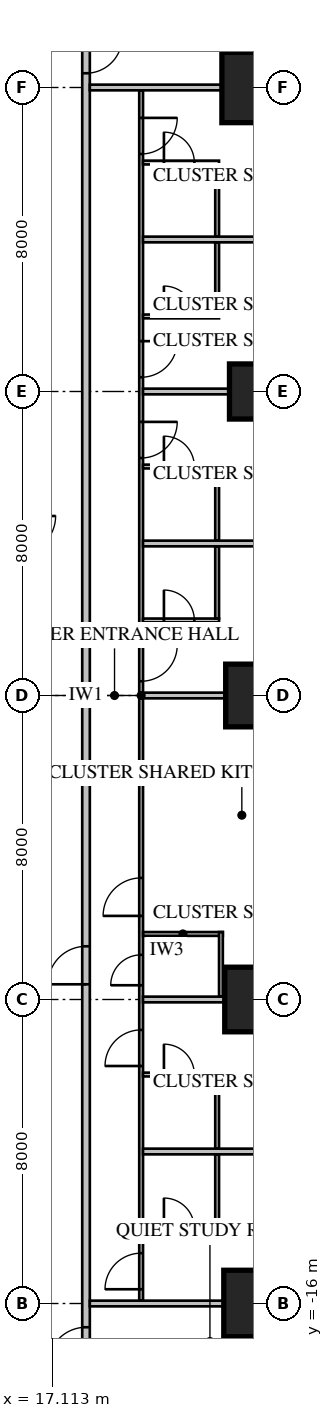
"""IFC4 building model, lengths in metres.
Left out: names, types, materials, properties, quantities, classifications, styles, units other than length and angle.
Written with IfcOpenShell. Run it as: python <this file> out.ifc"""

import sys

from ifc_helpers import new_model, si_unit, direction, frame, frame_2d, origin, origin_2d, place, context, subcontext, project, spatial, rectangle, extrude, element, fill, save


model = new_model("IFC4")
c1 = context("Model", 3, precision=1e-05, world=origin(), true_north=direction((0.0, 1.0)))
c2 = subcontext(c1, "Body", "Model", "MODEL_VIEW")
j1 = project(units=[si_unit("LENGTHUNIT", "METRE"), si_unit("PLANEANGLEUNIT", "RADIAN")], contexts=[c1])
p1 = place(None, origin())
s1 = spatial("IfcSite", under=j1, at=p1, CompositionType="ELEMENT")
p2 = place(p1, origin())
s2 = spatial("IfcBuilding", under=s1, at=p2, CompositionType="ELEMENT")
p3 = place(p2, frame((0.0, 0.0, 35.25)))
s3 = spatial("IfcBuildingStorey", under=s2, at=p3, CompositionType="ELEMENT", Elevation=35.25)
p4 = place(p3, frame((22.5, -16.0, 0.0), z_axis=(0.0, 0.0, 1.0), x_axis=(1.0, 0.0, 0.0)))
e1 = element("IfcColumn", 1, at=p4, inside=s3, PredefinedType="COLUMN", context=c2, shape_type="SweptSolid", body=[
    extrude(rectangle(XDim=1.75, YDim=1.75, at=origin_2d()), origin(), (0.0, 0.0, 1.0), 3.85),
])
p5 = place(p3, frame((22.5, -8.0, 0.0), z_axis=(0.0, 0.0, 1.0), x_axis=(1.0, 0.0, 0.0)))
e2 = element("IfcColumn", 2, at=p5, inside=s3, PredefinedType="COLUMN", context=c2, shape_type="SweptSolid", body=[
    extrude(rectangle(XDim=1.7, YDim=1.7, at=origin_2d()), origin(), (0.0, 0.0, 1.0), 3.85),
])
p6 = place(p3, frame((22.5, 0.0, 0.0), z_axis=(0.0, 0.0, 1.0), x_axis=(1.0, 0.0, 0.0)))
e3 = element("IfcColumn", 3, at=p6, inside=s3, PredefinedType="COLUMN", context=c2, shape_type="SweptSolid", body=[
    extrude(rectangle(XDim=1.65, YDim=1.65, at=origin_2d()), origin(), (0.0, 0.0, 1.0), 3.85),
])
p7 = place(p3, frame((22.5, 8.0, 0.0), z_axis=(0.0, 0.0, 1.0), x_axis=(1.0, 0.0, 0.0)))
e4 = element("IfcColumn", 4, at=p7, inside=s3, PredefinedType="COLUMN", context=c2, shape_type="SweptSolid", body=[
    extrude(rectangle(XDim=1.45, YDim=1.45, at=origin_2d()), origin(), (0.0, 0.0, 1.0), 3.85),
])
p8 = place(p3, frame((22.5, 16.0, 0.0), z_axis=(0.0, 0.0, 1.0), x_axis=(1.0, 0.0, 0.0)))
e5 = element("IfcColumn", 5, at=p8, inside=s3, PredefinedType="COLUMN", context=c2, shape_type="SweptSolid", body=[
    extrude(rectangle(XDim=1.85, YDim=1.85, at=origin_2d()), origin(), (0.0, 0.0, 1.0), 3.85),
])
p9 = place(p3, frame((18.0, -18.0, 0.0), z_axis=(0.0, 0.0, 1.0), x_axis=(0.0, 1.0, 0.0)))
e6 = element("IfcWall", 6, at=p9, inside=s3, PredefinedType="PARTITIONING", context=c2, shape_type="SweptSolid", body=[
    extrude(rectangle(XDim=36.0, YDim=0.2, at=frame_2d((18.0, 0.0))), origin(), (0.0, 0.0, 1.0), 3.65),
])
p10 = place(p9, frame((10.4, 0.0, 0.0)))
e7 = element("IfcOpeningElement", 7, at=p10, cuts=e6, PredefinedType="OPENING", context=c2, shape_type="SweptSolid", body=[
    extrude(rectangle(XDim=1.0, YDim=2.1, at=frame_2d((0.5, 1.05))), frame((0.0, 0.12, 0.0), z_axis=(0.0, -1.0, 0.0), x_axis=(1.0, 0.0, 0.0)), (0.0, 0.0, 1.0), 0.24),
])
p11 = place(p9, frame((0.375, 0.0, 0.0)))
e8 = element("IfcOpeningElement", 8, at=p11, cuts=e6, PredefinedType="OPENING", context=c2, shape_type="SweptSolid", body=[
    extrude(rectangle(XDim=1.0, YDim=2.1, at=frame_2d((0.5, 1.05))), frame((0.0, 0.12, 0.0), z_axis=(0.0, -1.0, 0.0), x_axis=(1.0, 0.0, 0.0)), (0.0, 0.0, 1.0), 0.24),
])
p12 = place(p9, frame((34.375, 0.0, 0.0)))
e9 = element("IfcOpeningElement", 9, at=p12, cuts=e6, PredefinedType="OPENING", context=c2, shape_type="SweptSolid", body=[
    extrude(rectangle(XDim=0.95, YDim=2.1, at=frame_2d((0.475, 1.05))), frame((0.0, 0.12, 0.0), z_axis=(0.0, -1.0, 0.0), x_axis=(1.0, 0.0, 0.0)), (0.0, 0.0, 1.0), 0.24),
])
p13 = place(p3, frame((19.45, -15.925, 0.0), z_axis=(0.0, 0.0, 1.0), x_axis=(0.0, 1.0, 0.0)))
e10 = element("IfcWall", 10, at=p13, inside=s3, PredefinedType="PARTITIONING", context=c2, shape_type="SweptSolid", body=[
    extrude(rectangle(XDim=31.85, YDim=0.1, at=frame_2d((15.925, 0.0))), origin(), (0.0, 0.0, 1.0), 3.65),
])
p14 = place(p13, frame((10.125, 0.0, 0.0)))
e11 = element("IfcOpeningElement", 11, at=p14, cuts=e10, PredefinedType="OPENING", context=c2, shape_type="SweptSolid", body=[
    extrude(rectangle(XDim=1.0, YDim=2.1, at=frame_2d((0.5, 1.05))), frame((0.0, 0.07, 0.0), z_axis=(0.0, -1.0, 0.0), x_axis=(1.0, 0.0, 0.0)), (0.0, 0.0, 1.0), 0.14),
])
p15 = place(p13, frame((8.3, 0.0, 0.0)))
e12 = element("IfcOpeningElement", 12, at=p15, cuts=e10, PredefinedType="OPENING", context=c2, shape_type="SweptSolid", body=[
    extrude(rectangle(XDim=0.8, YDim=2.1, at=frame_2d((0.4, 1.05))), frame((0.0, 0.07, 0.0), z_axis=(0.0, -1.0, 0.0), x_axis=(1.0, 0.0, 0.0)), (0.0, 0.0, 1.0), 0.14),
])
p16 = place(p13, frame((0.3, 0.0, 0.0)))
e13 = element("IfcOpeningElement", 13, at=p16, cuts=e10, PredefinedType="OPENING", context=c2, shape_type="SweptSolid", body=[
    extrude(rectangle(XDim=0.95, YDim=2.1, at=frame_2d((0.475, 1.05))), frame((0.0, 0.07, 0.0), z_axis=(0.0, -1.0, 0.0), x_axis=(1.0, 0.0, 0.0)), (0.0, 0.0, 1.0), 0.14),
])
p17 = place(p13, frame((6.175, 0.0, 0.0)))
e14 = element("IfcOpeningElement", 14, at=p17, cuts=e10, PredefinedType="OPENING", context=c2, shape_type="SweptSolid", body=[
    extrude(rectangle(XDim=0.95, YDim=2.1, at=frame_2d((0.475, 1.05))), frame((0.0, 0.07, 0.0), z_axis=(0.0, -1.0, 0.0), x_axis=(1.0, 0.0, 0.0)), (0.0, 0.0, 1.0), 0.14),
])
p18 = place(p13, frame((16.3, 0.0, 0.0)))
e15 = element("IfcOpeningElement", 15, at=p18, cuts=e10, PredefinedType="OPENING", context=c2, shape_type="SweptSolid", body=[
    extrude(rectangle(XDim=0.95, YDim=2.1, at=frame_2d((0.475, 1.05))), frame((0.0, 0.07, 0.0), z_axis=(0.0, -1.0, 0.0), x_axis=(1.0, 0.0, 0.0)), (0.0, 0.0, 1.0), 0.14),
])
p19 = place(p13, frame((22.175, 0.0, 0.0)))
e16 = element("IfcOpeningElement", 16, at=p19, cuts=e10, PredefinedType="OPENING", context=c2, shape_type="SweptSolid", body=[
    extrude(rectangle(XDim=0.95, YDim=2.1, at=frame_2d((0.475, 1.05))), frame((0.0, 0.07, 0.0), z_axis=(0.0, -1.0, 0.0), x_axis=(1.0, 0.0, 0.0)), (0.0, 0.0, 1.0), 0.14),
])
p20 = place(p13, frame((24.3, 0.0, 0.0)))
e17 = element("IfcOpeningElement", 17, at=p20, cuts=e10, PredefinedType="OPENING", context=c2, shape_type="SweptSolid", body=[
    extrude(rectangle(XDim=0.95, YDim=2.1, at=frame_2d((0.475, 1.05))), frame((0.0, 0.07, 0.0), z_axis=(0.0, -1.0, 0.0), x_axis=(1.0, 0.0, 0.0)), (0.0, 0.0, 1.0), 0.14),
])
p21 = place(p13, frame((30.175, 0.0, 0.0)))
e18 = element("IfcOpeningElement", 18, at=p21, cuts=e10, PredefinedType="OPENING", context=c2, shape_type="SweptSolid", body=[
    extrude(rectangle(XDim=0.95, YDim=2.1, at=frame_2d((0.475, 1.05))), frame((0.0, 0.07, 0.0), z_axis=(0.0, -1.0, 0.0), x_axis=(1.0, 0.0, 0.0)), (0.0, 0.0, 1.0), 0.14),
])
p22 = place(p3, frame((19.5, -6.275, 0.0), z_axis=(0.0, 0.0, 1.0), x_axis=(1.0, 0.0, 0.0)))
e19 = element("IfcWall", 19, at=p22, inside=s3, PredefinedType="PARTITIONING", context=c2, shape_type="SweptSolid", body=[
    extrude(rectangle(XDim=2.1, YDim=0.1, at=frame_2d((1.05, 0.0))), origin(), (0.0, 0.0, 1.0), 3.65),
])
p23 = place(p3, frame((21.55, -7.925, 0.0), z_axis=(0.0, 0.0, 1.0), x_axis=(0.0, 1.0, 0.0)))
e20 = element("IfcWall", 20, at=p23, inside=s3, PredefinedType="PARTITIONING", context=c2, shape_type="SweptSolid", body=[
    extrude(rectangle(XDim=1.7, YDim=0.1, at=frame_2d((0.85, 0.0))), origin(), (0.0, 0.0, 1.0), 3.65),
])
p24 = place(p3, frame((18.1, -16.0, 0.0), z_axis=(0.0, 0.0, 1.0), x_axis=(1.0, 0.0, 0.0)))
e21 = element("IfcWall", 21, at=p24, inside=s3, PredefinedType="PARTITIONING", context=c2, shape_type="SweptSolid", body=[
    extrude(rectangle(XDim=6.589, YDim=0.15, at=frame_2d((3.295, 0.0))), origin(), (0.0, 0.0, 1.0), 3.65),
])
for number, where, z_axis, x_axis in (
    (22, (19.5, -12.0, 0.0), (0.0, 0.0, 1.0), (1.0, 0.0, 0.0)),
    (23, (19.5, -8.0, 0.0), (0.0, 0.0, 1.0), (1.0, 0.0, 0.0)),
):
    element("IfcWall", number, at=place(p3, frame(where, z_axis=z_axis, x_axis=x_axis)), inside=s3, PredefinedType="PARTITIONING", context=c2, shape_type="SweptSolid", body=[
        extrude(rectangle(XDim=5.2, YDim=0.15, at=frame_2d((2.6, 0.0))), origin(), (0.0, 0.0, 1.0), 3.65),
    ])
p25 = place(p3, frame((19.5, 0.0, 0.0), z_axis=(0.0, 0.0, 1.0), x_axis=(1.0, 0.0, 0.0)))
e24 = element("IfcWall", 24, at=p25, inside=s3, PredefinedType="PARTITIONING", context=c2, shape_type="SweptSolid", body=[
    extrude(rectangle(XDim=5.2, YDim=0.15, at=frame_2d((2.6, 0.0))), origin(), (0.0, 0.0, 1.0), 2.957),
])
for number, where, z_axis, x_axis in (
    (25, (19.5, 4.0, 0.0), (0.0, 0.0, 1.0), (1.0, 0.0, 0.0)),
    (26, (19.5, 8.0, 0.0), (0.0, 0.0, 1.0), (1.0, 0.0, 0.0)),
    (27, (19.5, 12.0, 0.0), (0.0, 0.0, 1.0), (1.0, 0.0, 0.0)),
):
    element("IfcWall", number, at=place(p3, frame(where, z_axis=z_axis, x_axis=x_axis)), inside=s3, PredefinedType="PARTITIONING", context=c2, shape_type="SweptSolid", body=[
        extrude(rectangle(XDim=5.2, YDim=0.15, at=frame_2d((2.6, 0.0))), origin(), (0.0, 0.0, 1.0), 3.65),
    ])
p26 = place(p3, frame((18.1, 16.0, 0.0), z_axis=(0.0, 0.0, 1.0), x_axis=(1.0, 0.0, 0.0)))
e28 = element("IfcWall", 28, at=p26, inside=s3, PredefinedType="PARTITIONING", context=c2, shape_type="SweptSolid", body=[
    extrude(rectangle(XDim=6.589, YDim=0.15, at=frame_2d((3.295, 0.0))), origin(), (0.0, 0.0, 1.0), 3.65),
])
p27 = place(p3, frame((19.5, -14.025, 0.0), z_axis=(0.0, 0.0, 1.0), x_axis=(1.0, 0.0, 0.0)))
e29 = element("IfcWall", 29, at=p27, inside=s3, PredefinedType="PARTITIONING", context=c2, shape_type="SweptSolid", body=[
    extrude(rectangle(XDim=2.0, YDim=0.1, at=frame_2d((1.0, 0.0))), origin(), (0.0, 0.0, 1.0), 3.65),
])
p28 = place(p27, frame((0.55, 0.0, 0.0)))
e30 = element("IfcOpeningElement", 30, at=p28, cuts=e29, PredefinedType="OPENING", context=c2, shape_type="SweptSolid", body=[
    extrude(rectangle(XDim=0.8, YDim=2.1, at=frame_2d((0.4, 1.05))), frame((0.0, 0.07, 0.0), z_axis=(0.0, -1.0, 0.0), x_axis=(1.0, 0.0, 0.0)), (0.0, 0.0, 1.0), 0.14),
])
p29 = place(p3, frame((21.45, -13.975, 0.0), z_axis=(0.0, 0.0, 1.0), x_axis=(0.0, 1.0, 0.0)))
e31 = element("IfcWall", 31, at=p29, inside=s3, PredefinedType="PARTITIONING", context=c2, shape_type="SweptSolid", body=[
    extrude(rectangle(XDim=1.9, YDim=0.1, at=frame_2d((0.95, 0.0))), origin(), (0.0, 0.0, 1.0), 3.65),
])
p30 = place(p3, frame((19.5, -9.975, 0.0), z_axis=(0.0, 0.0, 1.0), x_axis=(1.0, 0.0, 0.0)))
e32 = element("IfcWall", 32, at=p30, inside=s3, PredefinedType="PARTITIONING", context=c2, shape_type="SweptSolid", body=[
    extrude(rectangle(XDim=2.0, YDim=0.1, at=frame_2d((1.0, 0.0))), origin(), (0.0, 0.0, 1.0), 3.65),
])
p31 = place(p30, frame((0.55, 0.0, 0.0)))
e33 = element("IfcOpeningElement", 33, at=p31, cuts=e32, PredefinedType="OPENING", context=c2, shape_type="SweptSolid", body=[
    extrude(rectangle(XDim=0.8, YDim=2.1, at=frame_2d((0.4, 1.05))), frame((0.0, 0.07, 0.0), z_axis=(0.0, -1.0, 0.0), x_axis=(1.0, 0.0, 0.0)), (0.0, 0.0, 1.0), 0.14),
])
p32 = place(p3, frame((21.45, -11.925, 0.0), z_axis=(0.0, 0.0, 1.0), x_axis=(0.0, 1.0, 0.0)))
e34 = element("IfcWall", 34, at=p32, inside=s3, PredefinedType="PARTITIONING", context=c2, shape_type="SweptSolid", body=[
    extrude(rectangle(XDim=1.9, YDim=0.1, at=frame_2d((0.95, 0.0))), origin(), (0.0, 0.0, 1.0), 3.65),
])
p33 = place(p3, frame((19.5, 1.975, 0.0), z_axis=(0.0, 0.0, 1.0), x_axis=(1.0, 0.0, 0.0)))
e35 = element("IfcWall", 35, at=p33, inside=s3, PredefinedType="PARTITIONING", context=c2, shape_type="SweptSolid", body=[
    extrude(rectangle(XDim=2.0, YDim=0.1, at=frame_2d((1.0, 0.0))), origin(), (0.0, 0.0, 1.0), 3.65),
])
p34 = place(p33, frame((0.55, 0.0, 0.0)))
e36 = element("IfcOpeningElement", 36, at=p34, cuts=e35, PredefinedType="OPENING", context=c2, shape_type="SweptSolid", body=[
    extrude(rectangle(XDim=0.8, YDim=2.1, at=frame_2d((0.4, 1.05))), frame((0.0, 0.07, 0.0), z_axis=(0.0, -1.0, 0.0), x_axis=(1.0, 0.0, 0.0)), (0.0, 0.0, 1.0), 0.14),
])
p35 = place(p3, frame((21.45, 2.025, 0.0), z_axis=(0.0, 0.0, 1.0), x_axis=(0.0, 1.0, 0.0)))
e37 = element("IfcWall", 37, at=p35, inside=s3, PredefinedType="PARTITIONING", context=c2, shape_type="SweptSolid", body=[
    extrude(rectangle(XDim=1.9, YDim=0.1, at=frame_2d((0.95, 0.0))), origin(), (0.0, 0.0, 1.0), 3.65),
])
p36 = place(p3, frame((19.5, 6.025, 0.0), z_axis=(0.0, 0.0, 1.0), x_axis=(1.0, 0.0, 0.0)))
e38 = element("IfcWall", 38, at=p36, inside=s3, PredefinedType="PARTITIONING", context=c2, shape_type="SweptSolid", body=[
    extrude(rectangle(XDim=2.0, YDim=0.1, at=frame_2d((1.0, 0.0))), origin(), (0.0, 0.0, 1.0), 3.65),
])
p37 = place(p36, frame((0.55, 0.0, 0.0)))
e39 = element("IfcOpeningElement", 39, at=p37, cuts=e38, PredefinedType="OPENING", context=c2, shape_type="SweptSolid", body=[
    extrude(rectangle(XDim=0.8, YDim=2.1, at=frame_2d((0.4, 1.05))), frame((0.0, 0.07, 0.0), z_axis=(0.0, -1.0, 0.0), x_axis=(1.0, 0.0, 0.0)), (0.0, 0.0, 1.0), 0.14),
])
p38 = place(p3, frame((21.45, 4.075, 0.0), z_axis=(0.0, 0.0, 1.0), x_axis=(0.0, 1.0, 0.0)))
e40 = element("IfcWall", 40, at=p38, inside=s3, PredefinedType="PARTITIONING", context=c2, shape_type="SweptSolid", body=[
    extrude(rectangle(XDim=1.9, YDim=0.1, at=frame_2d((0.95, 0.0))), origin(), (0.0, 0.0, 1.0), 3.65),
])
p39 = place(p3, frame((19.5, 9.975, 0.0), z_axis=(0.0, 0.0, 1.0), x_axis=(1.0, 0.0, 0.0)))
e41 = element("IfcWall", 41, at=p39, inside=s3, PredefinedType="PARTITIONING", context=c2, shape_type="SweptSolid", body=[
    extrude(rectangle(XDim=2.0, YDim=0.1, at=frame_2d((1.0, 0.0))), origin(), (0.0, 0.0, 1.0), 3.65),
])
p40 = place(p39, frame((0.55, 0.0, 0.0)))
e42 = element("IfcOpeningElement", 42, at=p40, cuts=e41, PredefinedType="OPENING", context=c2, shape_type="SweptSolid", body=[
    extrude(rectangle(XDim=0.8, YDim=2.1, at=frame_2d((0.4, 1.05))), frame((0.0, 0.07, 0.0), z_axis=(0.0, -1.0, 0.0), x_axis=(1.0, 0.0, 0.0)), (0.0, 0.0, 1.0), 0.14),
])
p41 = place(p3, frame((21.45, 10.025, 0.0), z_axis=(0.0, 0.0, 1.0), x_axis=(0.0, 1.0, 0.0)))
e43 = element("IfcWall", 43, at=p41, inside=s3, PredefinedType="PARTITIONING", context=c2, shape_type="SweptSolid", body=[
    extrude(rectangle(XDim=1.9, YDim=0.1, at=frame_2d((0.95, 0.0))), origin(), (0.0, 0.0, 1.0), 3.65),
])
p42 = place(p3, frame((19.5, 14.025, 0.0), z_axis=(0.0, 0.0, 1.0), x_axis=(1.0, 0.0, 0.0)))
e44 = element("IfcWall", 44, at=p42, inside=s3, PredefinedType="PARTITIONING", context=c2, shape_type="SweptSolid", body=[
    extrude(rectangle(XDim=2.0, YDim=0.1, at=frame_2d((1.0, 0.0))), origin(), (0.0, 0.0, 1.0), 3.65),
])
p43 = place(p42, frame((0.55, 0.0, 0.0)))
e45 = element("IfcOpeningElement", 45, at=p43, cuts=e44, PredefinedType="OPENING", context=c2, shape_type="SweptSolid", body=[
    extrude(rectangle(XDim=0.8, YDim=2.1, at=frame_2d((0.4, 1.05))), frame((0.0, 0.07, 0.0), z_axis=(0.0, -1.0, 0.0), x_axis=(1.0, 0.0, 0.0)), (0.0, 0.0, 1.0), 0.14),
])
p44 = place(p3, frame((21.45, 12.075, 0.0), z_axis=(0.0, 0.0, 1.0), x_axis=(0.0, 1.0, 0.0)))
e46 = element("IfcWall", 46, at=p44, inside=s3, PredefinedType="PARTITIONING", context=c2, shape_type="SweptSolid", body=[
    extrude(rectangle(XDim=1.9, YDim=0.1, at=frame_2d((0.95, 0.0))), origin(), (0.0, 0.0, 1.0), 3.65),
])
p45 = place(p10, origin())
e47 = element("IfcDoor", 47, at=p45, inside=s3, OperationType="SINGLE_SWING_LEFT", PredefinedType="DOOR", context=c2, shape_type="SweptSolid", body=[
    extrude(rectangle(XDim=1.0, YDim=2.1, at=frame_2d((0.5, 1.05))), frame((0.0, 0.025, 0.0), z_axis=(0.0, -1.0, 0.0), x_axis=(1.0, 0.0, 0.0)), (0.0, 0.0, 1.0), 0.05),
])
fill(e7, e47)
p46 = place(p14, origin())
e48 = element("IfcDoor", 48, at=p46, inside=s3, OperationType="SINGLE_SWING_LEFT", PredefinedType="DOOR", context=c2, shape_type="SweptSolid", body=[
    extrude(rectangle(XDim=1.0, YDim=2.1, at=frame_2d((0.5, 1.05))), frame((0.0, 0.025, 0.0), z_axis=(0.0, -1.0, 0.0), x_axis=(1.0, 0.0, 0.0)), (0.0, 0.0, 1.0), 0.05),
])
fill(e11, e48)
p47 = place(p15, origin())
e49 = element("IfcDoor", 49, at=p47, inside=s3, OperationType="SINGLE_SWING_LEFT", PredefinedType="DOOR", context=c2, shape_type="SweptSolid", body=[
    extrude(rectangle(XDim=0.8, YDim=2.1, at=frame_2d((0.4, 1.05))), frame((0.0, 0.025, 0.0), z_axis=(0.0, -1.0, 0.0), x_axis=(1.0, 0.0, 0.0)), (0.0, 0.0, 1.0), 0.05),
])
fill(e12, e49)
p48 = place(p11, origin())
e50 = element("IfcDoor", 50, at=p48, inside=s3, OperationType="SINGLE_SWING_LEFT", PredefinedType="DOOR", context=c2, shape_type="SweptSolid", body=[
    extrude(rectangle(XDim=1.0, YDim=2.1, at=frame_2d((0.5, 1.05))), frame((0.0, 0.025, 0.0), z_axis=(0.0, -1.0, 0.0), x_axis=(1.0, 0.0, 0.0)), (0.0, 0.0, 1.0), 0.05),
])
fill(e8, e50)
p49 = place(p16, origin())
e51 = element("IfcDoor", 51, at=p49, inside=s3, OperationType="SINGLE_SWING_LEFT", PredefinedType="DOOR", context=c2, shape_type="SweptSolid", body=[
    extrude(rectangle(XDim=0.95, YDim=2.1, at=frame_2d((0.475, 1.05))), frame((0.0, 0.025, 0.0), z_axis=(0.0, -1.0, 0.0), x_axis=(1.0, 0.0, 0.0)), (0.0, 0.0, 1.0), 0.05),
])
fill(e13, e51)
p50 = place(p28, origin())
e52 = element("IfcDoor", 52, at=p50, inside=s3, OperationType="SINGLE_SWING_LEFT", PredefinedType="DOOR", context=c2, shape_type="SweptSolid", body=[
    extrude(rectangle(XDim=0.8, YDim=2.1, at=frame_2d((0.4, 1.05))), frame((0.0, 0.025, 0.0), z_axis=(0.0, -1.0, 0.0), x_axis=(1.0, 0.0, 0.0)), (0.0, 0.0, 1.0), 0.05),
])
fill(e30, e52)
p51 = place(p17, origin())
e53 = element("IfcDoor", 53, at=p51, inside=s3, OperationType="SINGLE_SWING_LEFT", PredefinedType="DOOR", context=c2, shape_type="SweptSolid", body=[
    extrude(rectangle(XDim=0.95, YDim=2.1, at=frame_2d((0.475, 1.05))), frame((0.0, 0.025, 0.0), z_axis=(0.0, -1.0, 0.0), x_axis=(1.0, 0.0, 0.0)), (0.0, 0.0, 1.0), 0.05),
])
fill(e14, e53)
p52 = place(p31, origin())
e54 = element("IfcDoor", 54, at=p52, inside=s3, OperationType="SINGLE_SWING_LEFT", PredefinedType="DOOR", context=c2, shape_type="SweptSolid", body=[
    extrude(rectangle(XDim=0.8, YDim=2.1, at=frame_2d((0.4, 1.05))), frame((0.0, 0.025, 0.0), z_axis=(0.0, -1.0, 0.0), x_axis=(1.0, 0.0, 0.0)), (0.0, 0.0, 1.0), 0.05),
])
fill(e33, e54)
p53 = place(p18, origin())
e55 = element("IfcDoor", 55, at=p53, inside=s3, OperationType="SINGLE_SWING_RIGHT", PredefinedType="DOOR", context=c2, shape_type="SweptSolid", body=[
    extrude(rectangle(XDim=0.95, YDim=2.1, at=frame_2d((0.475, 1.05))), frame((0.0, 0.025, 0.0), z_axis=(0.0, -1.0, 0.0), x_axis=(1.0, 0.0, 0.0)), (0.0, 0.0, 1.0), 0.05),
])
fill(e15, e55)
p54 = place(p34, origin())
e56 = element("IfcDoor", 56, at=p54, inside=s3, OperationType="SINGLE_SWING_LEFT", PredefinedType="DOOR", context=c2, shape_type="SweptSolid", body=[
    extrude(rectangle(XDim=0.8, YDim=2.1, at=frame_2d((0.4, 1.05))), frame((0.0, 0.025, 0.0), z_axis=(0.0, -1.0, 0.0), x_axis=(1.0, 0.0, 0.0)), (0.0, 0.0, 1.0), 0.05),
])
fill(e36, e56)
p55 = place(p19, origin())
e57 = element("IfcDoor", 57, at=p55, inside=s3, OperationType="SINGLE_SWING_RIGHT", PredefinedType="DOOR", context=c2, shape_type="SweptSolid", body=[
    extrude(rectangle(XDim=0.95, YDim=2.1, at=frame_2d((0.475, 1.05))), frame((0.0, 0.025, 0.0), z_axis=(0.0, -1.0, 0.0), x_axis=(1.0, 0.0, 0.0)), (0.0, 0.0, 1.0), 0.05),
])
fill(e16, e57)
p56 = place(p37, origin())
e58 = element("IfcDoor", 58, at=p56, inside=s3, OperationType="SINGLE_SWING_LEFT", PredefinedType="DOOR", context=c2, shape_type="SweptSolid", body=[
    extrude(rectangle(XDim=0.8, YDim=2.1, at=frame_2d((0.4, 1.05))), frame((0.0, 0.025, 0.0), z_axis=(0.0, -1.0, 0.0), x_axis=(1.0, 0.0, 0.0)), (0.0, 0.0, 1.0), 0.05),
])
fill(e39, e58)
p57 = place(p20, origin())
e59 = element("IfcDoor", 59, at=p57, inside=s3, OperationType="SINGLE_SWING_RIGHT", PredefinedType="DOOR", context=c2, shape_type="SweptSolid", body=[
    extrude(rectangle(XDim=0.95, YDim=2.1, at=frame_2d((0.475, 1.05))), frame((0.0, 0.025, 0.0), z_axis=(0.0, -1.0, 0.0), x_axis=(1.0, 0.0, 0.0)), (0.0, 0.0, 1.0), 0.05),
])
fill(e17, e59)
p58 = place(p40, origin())
e60 = element("IfcDoor", 60, at=p58, inside=s3, OperationType="SINGLE_SWING_LEFT", PredefinedType="DOOR", context=c2, shape_type="SweptSolid", body=[
    extrude(rectangle(XDim=0.8, YDim=2.1, at=frame_2d((0.4, 1.05))), frame((0.0, 0.025, 0.0), z_axis=(0.0, -1.0, 0.0), x_axis=(1.0, 0.0, 0.0)), (0.0, 0.0, 1.0), 0.05),
])
fill(e42, e60)
p59 = place(p21, origin())
e61 = element("IfcDoor", 61, at=p59, inside=s3, OperationType="SINGLE_SWING_RIGHT", PredefinedType="DOOR", context=c2, shape_type="SweptSolid", body=[
    extrude(rectangle(XDim=0.95, YDim=2.1, at=frame_2d((0.475, 1.05))), frame((0.0, 0.025, 0.0), z_axis=(0.0, -1.0, 0.0), x_axis=(1.0, 0.0, 0.0)), (0.0, 0.0, 1.0), 0.05),
])
fill(e18, e61)
p60 = place(p43, origin())
e62 = element("IfcDoor", 62, at=p60, inside=s3, OperationType="SINGLE_SWING_LEFT", PredefinedType="DOOR", context=c2, shape_type="SweptSolid", body=[
    extrude(rectangle(XDim=0.8, YDim=2.1, at=frame_2d((0.4, 1.05))), frame((0.0, 0.025, 0.0), z_axis=(0.0, -1.0, 0.0), x_axis=(1.0, 0.0, 0.0)), (0.0, 0.0, 1.0), 0.05),
])
fill(e45, e62)
p61 = place(p12, origin())
e63 = element("IfcDoor", 63, at=p61, inside=s3, OperationType="SINGLE_SWING_RIGHT", PredefinedType="DOOR", context=c2, shape_type="SweptSolid", body=[
    extrude(rectangle(XDim=0.95, YDim=2.1, at=frame_2d((0.475, 1.05))), frame((0.0, 0.025, 0.0), z_axis=(0.0, -1.0, 0.0), x_axis=(1.0, 0.0, 0.0)), (0.0, 0.0, 1.0), 0.05),
])
fill(e9, e63)
save(model, sys.argv[1])
